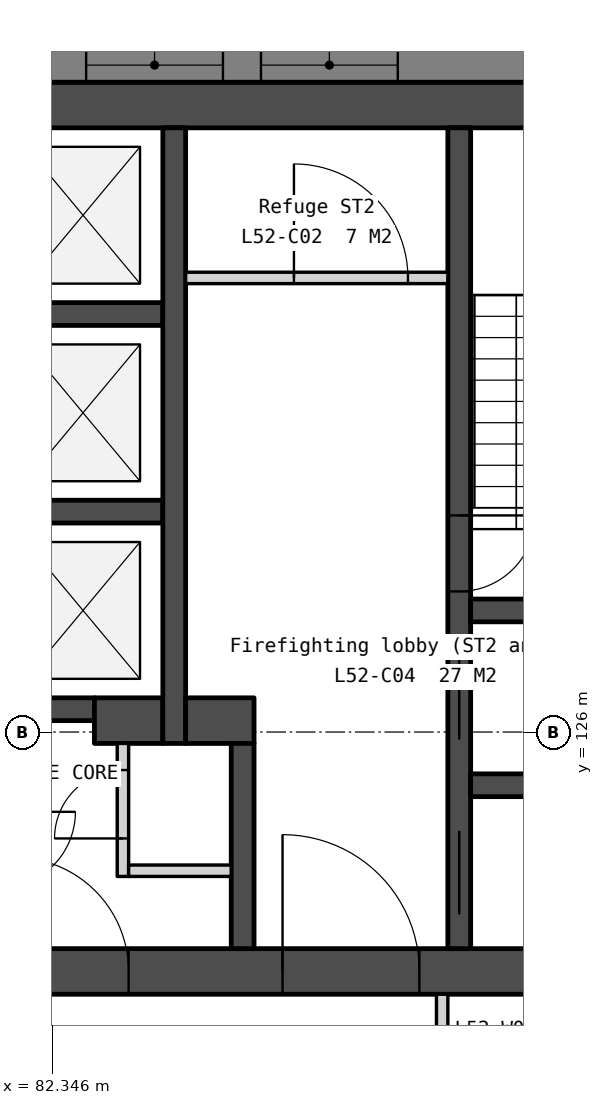
"""IFC4 building model, lengths in metres.
Left out: names, types, materials, properties, quantities, classifications, styles, units other than length and angle.
Written with IfcOpenShell. Run it as: python <this file> out.ifc"""

import sys

from ifc_helpers import new_model, si_unit, direction, frame, frame_2d, origin, place, context, subcontext, project, spatial, polyline, rectangle, outline, extrude, element, fill, save


model = new_model("IFC4")
c1 = context("Model", 3, precision=1e-05, world=origin(), true_north=direction((0.0, 1.0)))
c2 = subcontext(c1, "Body", "Model", "MODEL_VIEW")
j1 = project(units=[si_unit("LENGTHUNIT", "METRE"), si_unit("PLANEANGLEUNIT", "RADIAN")], contexts=[c1])
p1 = place(None, origin())
s1 = spatial("IfcSite", under=j1, at=p1, CompositionType="ELEMENT")
p2 = place(p1, origin())
s2 = spatial("IfcBuilding", under=s1, at=p2, CompositionType="ELEMENT")
p3 = place(p2, frame((0.0, 0.0, 207.5)))
s3 = spatial("IfcBuildingStorey", under=s2, at=p3, CompositionType="ELEMENT", Elevation=207.5)
p4 = place(p3, frame((69.0, 134.25, 0.0), z_axis=(0.0, 0.0, 1.0), x_axis=(1.0, 0.0, 0.0)))
e1 = element("IfcWall", 1, at=p4, inside=s3, PredefinedType="SOLIDWALL", context=c2, shape_type="SweptSolid", body=[
    extrude(rectangle(XDim=22.0, YDim=0.6, at=frame_2d((11.0, 0.0))), origin(), (0.0, 0.0, 1.0), 3.75),
])
p5 = place(p3, frame((69.0, 122.85, 0.0), z_axis=(0.0, 0.0, 1.0), x_axis=(1.0, 0.0, 0.0)))
e2 = element("IfcWall", 2, at=p5, inside=s3, PredefinedType="SOLIDWALL", context=c2, shape_type="SweptSolid", body=[
    extrude(rectangle(XDim=22.0, YDim=0.6, at=frame_2d((11.0, 0.0))), origin(), (0.0, 0.0, 1.0), 3.75),
])
p6 = place(p5, frame((16.375, 0.0, 0.0)))
e3 = element("IfcOpeningElement", 3, at=p6, cuts=e2, PredefinedType="OPENING", context=c2, shape_type="SweptSolid", body=[
    extrude(rectangle(XDim=1.8, YDim=2.1, at=frame_2d((0.9, 1.05))), frame((0.0, 0.31, 0.0), z_axis=(0.0, -1.0, 0.0), x_axis=(1.0, 0.0, 0.0)), (0.0, 0.0, 1.0), 0.62),
])
p7 = place(p5, frame((3.825, 0.0, 0.0)))
e4 = element("IfcOpeningElement", 4, at=p7, cuts=e2, PredefinedType="OPENING", context=c2, shape_type="SweptSolid", body=[
    extrude(rectangle(XDim=1.8, YDim=2.1, at=frame_2d((0.9, 1.05))), frame((0.0, 0.31, 0.0), z_axis=(0.0, -1.0, 0.0), x_axis=(1.0, 0.0, 0.0)), (0.0, 0.0, 1.0), 0.62),
])
p8 = place(p5, frame((12.85, 0.0, 0.0)))
e5 = element("IfcOpeningElement", 5, at=p8, cuts=e2, PredefinedType="OPENING", context=c2, shape_type="SweptSolid", body=[
    extrude(rectangle(XDim=1.5, YDim=2.1, at=frame_2d((0.75, 1.05))), frame((0.0, 0.31, 0.0), z_axis=(0.0, -1.0, 0.0), x_axis=(1.0, 0.0, 0.0)), (0.0, 0.0, 1.0), 0.62),
])
for number, where, z_axis, x_axis in (
    (6, (81.7, 131.5, 0.0), (0.0, 0.0, 1.0), (1.0, 0.0, 0.0)),
    (7, (81.7, 128.9, 0.0), (0.0, 0.0, 1.0), (1.0, 0.0, 0.0)),
):
    element("IfcWall", number, at=place(p3, frame(where, z_axis=z_axis, x_axis=x_axis)), inside=s3, PredefinedType="SOLIDWALL", context=c2, shape_type="SweptSolid", body=[
        extrude(rectangle(XDim=2.1, YDim=0.3, at=frame_2d((1.05, 0.0))), origin(), (0.0, 0.0, 1.0), 3.75),
    ])
p9 = place(p3, frame((81.7, 126.3, 0.0), z_axis=(0.0, 0.0, 1.0), x_axis=(1.0, 0.0, 0.0)))
e8 = element("IfcWall", 8, at=p9, inside=s3, PredefinedType="SOLIDWALL", context=c2, shape_type="SweptSolid", body=[
    extrude(rectangle(XDim=1.2, YDim=0.3, at=frame_2d((0.6, 0.0))), origin(), (0.0, 0.0, 1.0), 3.75),
])
p10 = place(p3, frame((82.9, 126.15, 0.0), z_axis=(0.0, 0.0, 1.0), x_axis=(1.0, 0.0, 0.0)))
e9 = element("IfcWall", 9, at=p10, inside=s3, PredefinedType="SOLIDWALL", context=c2, shape_type="SweptSolid", body=[
    extrude(rectangle(XDim=0.9, YDim=0.6, at=frame_2d((0.45, 0.0))), origin(), (0.0, 0.0, 1.0), 3.75),
])
p11 = place(p3, frame((83.275, 125.85, 0.0), z_axis=(0.0, 0.0, 1.0), x_axis=(0.0, -1.0, 0.0)))
e10 = element("IfcWall", 10, at=p11, inside=s3, PredefinedType="PARTITIONING", context=c2, shape_type="SweptSolid", body=[
    extrude(rectangle(XDim=1.75, YDim=0.15, at=frame_2d((0.875, 0.0))), origin(), (0.0, 0.0, 1.0), 3.75),
])
p12 = place(p11, frame((0.35, 0.0, 0.0)))
e11 = element("IfcOpeningElement", 11, at=p12, cuts=e10, PredefinedType="OPENING", context=c2, shape_type="SweptSolid", body=[
    extrude(rectangle(XDim=0.9, YDim=2.1, at=frame_2d((0.45, 1.05))), frame((0.0, 0.085, 0.0), z_axis=(0.0, -1.0, 0.0), x_axis=(1.0, 0.0, 0.0)), (0.0, 0.0, 1.0), 0.17),
])
p13 = place(p3, frame((83.35, 124.175, 0.0), z_axis=(0.0, 0.0, 1.0), x_axis=(1.0, 0.0, 0.0)))
e12 = element("IfcWall", 12, at=p13, inside=s3, PredefinedType="PARTITIONING", context=c2, shape_type="SweptSolid", body=[
    extrude(rectangle(XDim=1.35, YDim=0.15, at=frame_2d((0.675, 0.0))), origin(), (0.0, 0.0, 1.0), 3.75),
])
p14 = place(p3, frame((83.95, 133.95, 0.0), z_axis=(0.0, 0.0, 1.0), x_axis=(0.0, -1.0, 0.0)))
e13 = element("IfcWall", 13, at=p14, inside=s3, PredefinedType="SOLIDWALL", context=c2, shape_type="SweptSolid", body=[
    extrude(rectangle(XDim=8.1, YDim=0.3, at=frame_2d((4.05, 0.0))), origin(), (0.0, 0.0, 1.0), 3.75),
])
p15 = place(p3, frame((84.1, 131.975, 0.0), z_axis=(0.0, 0.0, 1.0), x_axis=(1.0, 0.0, 0.0)))
e14 = element("IfcWall", 14, at=p15, inside=s3, PredefinedType="PARTITIONING", context=c2, shape_type="SweptSolid", body=[
    extrude(rectangle(XDim=3.45, YDim=0.15, at=frame_2d((1.725, 0.0))), origin(), (0.0, 0.0, 1.0), 3.75),
])
p16 = place(p15, frame((1.425, 0.0, 0.0)))
e15 = element("IfcOpeningElement", 15, at=p16, cuts=e14, PredefinedType="OPENING", context=c2, shape_type="SweptSolid", body=[
    extrude(rectangle(XDim=1.5, YDim=2.1, at=frame_2d((0.75, 1.05))), frame((0.0, 0.085, 0.0), z_axis=(0.0, -1.0, 0.0), x_axis=(1.0, 0.0, 0.0)), (0.0, 0.0, 1.0), 0.17),
])
p17 = place(p3, frame((84.1, 126.15, 0.0), z_axis=(0.0, 0.0, 1.0), x_axis=(1.0, 0.0, 0.0)))
e16 = element("IfcWall", 16, at=p17, inside=s3, PredefinedType="SOLIDWALL", context=c2, shape_type="SweptSolid", body=[
    extrude(rectangle(XDim=0.9, YDim=0.6, at=frame_2d((0.45, 0.0))), origin(), (0.0, 0.0, 1.0), 3.75),
])
p18 = place(p3, frame((84.85, 125.85, 0.0), z_axis=(0.0, 0.0, 1.0), x_axis=(0.0, -1.0, 0.0)))
e17 = element("IfcWall", 17, at=p18, inside=s3, PredefinedType="SOLIDWALL", context=c2, shape_type="SweptSolid", body=[
    extrude(rectangle(XDim=2.7, YDim=0.3, at=frame_2d((1.35, 0.0))), origin(), (0.0, 0.0, 1.0), 3.75),
])
p19 = place(p3, frame((87.7, 133.95, 0.0), z_axis=(0.0, 0.0, 1.0), x_axis=(0.0, -1.0, 0.0)))
e18 = element("IfcWall", 18, at=p19, inside=s3, PredefinedType="SOLIDWALL", context=c2, shape_type="SweptSolid", body=[
    extrude(rectangle(XDim=10.8, YDim=0.3, at=frame_2d((5.4, 0.0))), origin(), (0.0, 0.0, 1.0), 3.75),
])
p20 = place(p19, frame((6.95, 0.0, 0.0)))
e19 = element("IfcOpeningElement", 19, at=p20, cuts=e18, PredefinedType="OPENING", context=c2, shape_type="SweptSolid", body=[
    extrude(rectangle(XDim=1.1, YDim=2.1, at=frame_2d((0.55, 1.05))), frame((0.0, 0.16, 0.0), z_axis=(0.0, -1.0, 0.0), x_axis=(1.0, 0.0, 0.0)), (0.0, 0.0, 1.0), 0.32),
])
p21 = place(p19, frame((5.1, 0.0, 0.0)))
e20 = element("IfcOpeningElement", 20, at=p21, cuts=e18, PredefinedType="OPENING", context=c2, shape_type="SweptSolid", body=[
    extrude(rectangle(XDim=1.0, YDim=2.1, at=frame_2d((0.5, 1.05))), frame((0.0, 0.16, 0.0), z_axis=(0.0, -1.0, 0.0), x_axis=(1.0, 0.0, 0.0)), (0.0, 0.0, 1.0), 0.32),
])
p22 = place(p19, frame((9.25, 0.0, 0.0)))
e21 = element("IfcOpeningElement", 21, at=p22, cuts=e18, PredefinedType="OPENING", context=c2, shape_type="SweptSolid", body=[
    extrude(rectangle(XDim=1.1, YDim=2.1, at=frame_2d((0.55, 1.05))), frame((0.0, 0.16, 0.0), z_axis=(0.0, -1.0, 0.0), x_axis=(1.0, 0.0, 0.0)), (0.0, 0.0, 1.0), 0.32),
])
for number, where, z_axis, x_axis in (
    (22, (87.85, 127.6, 0.0), (0.0, 0.0, 1.0), (1.0, 0.0, 0.0)),
    (23, (87.85, 125.3, 0.0), (0.0, 0.0, 1.0), (1.0, 0.0, 0.0)),
):
    element("IfcWall", number, at=place(p3, frame(where, z_axis=z_axis, x_axis=x_axis)), inside=s3, PredefinedType="SOLIDWALL", context=c2, shape_type="SweptSolid", body=[
        extrude(rectangle(XDim=2.55, YDim=0.3, at=frame_2d((1.275, 0.0))), origin(), (0.0, 0.0, 1.0), 3.75),
    ])
p23 = place(p3, frame((99.365, 134.775, -0.15), z_axis=(0.0, 0.0, 1.0), x_axis=(-1.0, 0.0, 0.0)))
e24 = element("IfcWall", 24, at=p23, inside=s3, PredefinedType="SOLIDWALL", context=c2, shape_type="SweptSolid", body=[
    extrude(outline(polyline([(38.729, 0.0), (38.729, 3.9), (0.0, 3.9), (0.0, 0.0), (38.729, 0.0)])), frame((0.0, 0.225, 0.0), z_axis=(0.0, -1.0, 0.0), x_axis=(1.0, 0.0, 0.0)), (0.0, 0.0, 1.0), 0.45),
])
p24 = place(p23, frame((2.791, 0.0, 0.95)))
e25 = element("IfcOpeningElement", 25, at=p24, cuts=e24, PredefinedType="OPENING", context=c2, shape_type="SweptSolid", body=[
    extrude(rectangle(XDim=1.8, YDim=2.2, at=frame_2d((0.9, 1.1))), frame((0.0, 0.235, 0.0), z_axis=(0.0, -1.0, 0.0), x_axis=(1.0, 0.0, 0.0)), (0.0, 0.0, 1.0), 0.47),
])
p25 = place(p23, frame((5.091, 0.0, 0.95)))
e26 = element("IfcOpeningElement", 26, at=p25, cuts=e24, PredefinedType="OPENING", context=c2, shape_type="SweptSolid", body=[
    extrude(rectangle(XDim=1.8, YDim=2.2, at=frame_2d((0.9, 1.1))), frame((0.0, 0.235, 0.0), z_axis=(0.0, -1.0, 0.0), x_axis=(1.0, 0.0, 0.0)), (0.0, 0.0, 1.0), 0.47),
])
p26 = place(p23, frame((12.473, 0.0, 0.95)))
e27 = element("IfcOpeningElement", 27, at=p26, cuts=e24, PredefinedType="OPENING", context=c2, shape_type="SweptSolid", body=[
    extrude(rectangle(XDim=1.8, YDim=2.2, at=frame_2d((0.9, 1.1))), frame((0.0, 0.235, 0.0), z_axis=(0.0, -1.0, 0.0), x_axis=(1.0, 0.0, 0.0)), (0.0, 0.0, 1.0), 0.47),
])
p27 = place(p23, frame((14.773, 0.0, 0.95)))
e28 = element("IfcOpeningElement", 28, at=p27, cuts=e24, PredefinedType="OPENING", context=c2, shape_type="SweptSolid", body=[
    extrude(rectangle(XDim=1.8, YDim=2.2, at=frame_2d((0.9, 1.1))), frame((0.0, 0.235, 0.0), z_axis=(0.0, -1.0, 0.0), x_axis=(1.0, 0.0, 0.0)), (0.0, 0.0, 1.0), 0.47),
])
p28 = place(p23, frame((22.156, 0.0, 0.95)))
e29 = element("IfcOpeningElement", 29, at=p28, cuts=e24, PredefinedType="OPENING", context=c2, shape_type="SweptSolid", body=[
    extrude(rectangle(XDim=1.8, YDim=2.2, at=frame_2d((0.9, 1.1))), frame((0.0, 0.235, 0.0), z_axis=(0.0, -1.0, 0.0), x_axis=(1.0, 0.0, 0.0)), (0.0, 0.0, 1.0), 0.47),
])
p29 = place(p23, frame((24.456, 0.0, 0.95)))
e30 = element("IfcOpeningElement", 30, at=p29, cuts=e24, PredefinedType="OPENING", context=c2, shape_type="SweptSolid", body=[
    extrude(rectangle(XDim=1.8, YDim=2.2, at=frame_2d((0.9, 1.1))), frame((0.0, 0.235, 0.0), z_axis=(0.0, -1.0, 0.0), x_axis=(1.0, 0.0, 0.0)), (0.0, 0.0, 1.0), 0.47),
])
p30 = place(p23, frame((31.838, 0.0, 0.95)))
e31 = element("IfcOpeningElement", 31, at=p30, cuts=e24, PredefinedType="OPENING", context=c2, shape_type="SweptSolid", body=[
    extrude(rectangle(XDim=1.8, YDim=2.2, at=frame_2d((0.9, 1.1))), frame((0.0, 0.235, 0.0), z_axis=(0.0, -1.0, 0.0), x_axis=(1.0, 0.0, 0.0)), (0.0, 0.0, 1.0), 0.47),
])
p31 = place(p23, frame((34.138, 0.0, 0.95)))
e32 = element("IfcOpeningElement", 32, at=p31, cuts=e24, PredefinedType="OPENING", context=c2, shape_type="SweptSolid", body=[
    extrude(rectangle(XDim=1.8, YDim=2.2, at=frame_2d((0.9, 1.1))), frame((0.0, 0.235, 0.0), z_axis=(0.0, -1.0, 0.0), x_axis=(1.0, 0.0, 0.0)), (0.0, 0.0, 1.0), 0.47),
])
p32 = place(p3, frame((81.505, 98.627, -0.15), z_axis=(0.0, 0.0, 1.0), x_axis=(0.500002199942, 0.866024133644, 0.0)))
e33 = element("IfcWall", 33, at=p32, inside=s3, PredefinedType="SOLIDWALL", context=c2, shape_type="SweptSolid", body=[
    extrude(outline(polyline([(38.729, 0.0), (38.729, 3.9), (0.0, 3.9), (0.0, 0.0), (38.729, 0.0)])), frame((0.0, 0.225, 0.0), z_axis=(0.0, -1.0, 0.0), x_axis=(1.0, 0.0, 0.0)), (0.0, 0.0, 1.0), 0.45),
])
p33 = place(p32, frame((2.791, 0.0, 0.95)))
e34 = element("IfcOpeningElement", 34, at=p33, cuts=e33, PredefinedType="OPENING", context=c2, shape_type="SweptSolid", body=[
    extrude(rectangle(XDim=1.8, YDim=2.2, at=frame_2d((0.9, 1.1))), frame((0.0, 0.235, 0.0), z_axis=(0.0, -1.0, 0.0), x_axis=(1.0, 0.0, 0.0)), (0.0, 0.0, 1.0), 0.47),
])
p34 = place(p32, frame((5.091, 0.0, 0.95)))
e35 = element("IfcOpeningElement", 35, at=p34, cuts=e33, PredefinedType="OPENING", context=c2, shape_type="SweptSolid", body=[
    extrude(rectangle(XDim=1.8, YDim=2.2, at=frame_2d((0.9, 1.1))), frame((0.0, 0.235, 0.0), z_axis=(0.0, -1.0, 0.0), x_axis=(1.0, 0.0, 0.0)), (0.0, 0.0, 1.0), 0.47),
])
p35 = place(p32, frame((12.473, 0.0, 0.95)))
e36 = element("IfcOpeningElement", 36, at=p35, cuts=e33, PredefinedType="OPENING", context=c2, shape_type="SweptSolid", body=[
    extrude(rectangle(XDim=1.8, YDim=2.2, at=frame_2d((0.9, 1.1))), frame((0.0, 0.235, 0.0), z_axis=(0.0, -1.0, 0.0), x_axis=(1.0, 0.0, 0.0)), (0.0, 0.0, 1.0), 0.47),
])
p36 = place(p32, frame((14.773, 0.0, 0.95)))
e37 = element("IfcOpeningElement", 37, at=p36, cuts=e33, PredefinedType="OPENING", context=c2, shape_type="SweptSolid", body=[
    extrude(rectangle(XDim=1.8, YDim=2.2, at=frame_2d((0.9, 1.1))), frame((0.0, 0.235, 0.0), z_axis=(0.0, -1.0, 0.0), x_axis=(1.0, 0.0, 0.0)), (0.0, 0.0, 1.0), 0.47),
])
p37 = place(p32, frame((22.156, 0.0, 0.95)))
e38 = element("IfcOpeningElement", 38, at=p37, cuts=e33, PredefinedType="OPENING", context=c2, shape_type="SweptSolid", body=[
    extrude(rectangle(XDim=1.8, YDim=2.2, at=frame_2d((0.9, 1.1))), frame((0.0, 0.235, 0.0), z_axis=(0.0, -1.0, 0.0), x_axis=(1.0, 0.0, 0.0)), (0.0, 0.0, 1.0), 0.47),
])
p38 = place(p32, frame((24.456, 0.0, 0.95)))
e39 = element("IfcOpeningElement", 39, at=p38, cuts=e33, PredefinedType="OPENING", context=c2, shape_type="SweptSolid", body=[
    extrude(rectangle(XDim=1.8, YDim=2.2, at=frame_2d((0.9, 1.1))), frame((0.0, 0.235, 0.0), z_axis=(0.0, -1.0, 0.0), x_axis=(1.0, 0.0, 0.0)), (0.0, 0.0, 1.0), 0.47),
])
p39 = place(p32, frame((31.838, 0.0, 0.95)))
e40 = element("IfcOpeningElement", 40, at=p39, cuts=e33, PredefinedType="OPENING", context=c2, shape_type="SweptSolid", body=[
    extrude(rectangle(XDim=1.8, YDim=2.2, at=frame_2d((0.9, 1.1))), frame((0.0, 0.235, 0.0), z_axis=(0.0, -1.0, 0.0), x_axis=(1.0, 0.0, 0.0)), (0.0, 0.0, 1.0), 0.47),
])
p40 = place(p32, frame((34.138, 0.0, 0.95)))
e41 = element("IfcOpeningElement", 41, at=p40, cuts=e33, PredefinedType="OPENING", context=c2, shape_type="SweptSolid", body=[
    extrude(rectangle(XDim=1.8, YDim=2.2, at=frame_2d((0.9, 1.1))), frame((0.0, 0.235, 0.0), z_axis=(0.0, -1.0, 0.0), x_axis=(1.0, 0.0, 0.0)), (0.0, 0.0, 1.0), 0.47),
])
p41 = place(p3, frame((87.475, 120.05, 0.0), z_axis=(0.0, 0.0, 1.0), x_axis=(0.0, 1.0, 0.0)))
e42 = element("IfcWall", 42, at=p41, inside=s3, PredefinedType="PARTITIONING", context=c2, shape_type="SweptSolid", body=[
    extrude(rectangle(XDim=2.5, YDim=0.15, at=frame_2d((1.25, 0.0))), origin(), (0.0, 0.0, 1.0), 3.75),
])
p42 = place(p41, frame((0.75, 0.0, 0.0)))
e43 = element("IfcOpeningElement", 43, at=p42, cuts=e42, PredefinedType="OPENING", context=c2, shape_type="SweptSolid", body=[
    extrude(rectangle(XDim=1.0, YDim=2.1, at=frame_2d((0.5, 1.05))), frame((0.0, 0.085, 0.0), z_axis=(0.0, -1.0, 0.0), x_axis=(1.0, 0.0, 0.0)), (0.0, 0.0, 1.0), 0.17),
])
p43 = place(p20, origin())
e44 = element("IfcDoor", 44, at=p43, inside=s3, OperationType="SLIDING_TO_LEFT", PredefinedType="DOOR", context=c2, shape_type="SweptSolid", body=[
    extrude(rectangle(XDim=1.1, YDim=2.1, at=frame_2d((0.55, 1.05))), frame((0.0, 0.025, 0.0), z_axis=(0.0, -1.0, 0.0), x_axis=(1.0, 0.0, 0.0)), (0.0, 0.0, 1.0), 0.05),
])
fill(e19, e44)
p44 = place(p6, origin())
e45 = element("IfcDoor", 45, at=p44, inside=s3, OperationType="DOUBLE_DOOR_DOUBLE_SWING", PredefinedType="DOOR", context=c2, shape_type="SweptSolid", body=[
    extrude(rectangle(XDim=1.8, YDim=2.1, at=frame_2d((0.9, 1.05))), frame((0.0, 0.025, 0.0), z_axis=(0.0, -1.0, 0.0), x_axis=(1.0, 0.0, 0.0)), (0.0, 0.0, 1.0), 0.05),
])
fill(e3, e45)
p45 = place(p8, origin())
e46 = element("IfcDoor", 46, at=p45, inside=s3, OperationType="DOUBLE_DOOR_DOUBLE_SWING", PredefinedType="DOOR", context=c2, shape_type="SweptSolid", body=[
    extrude(rectangle(XDim=1.5, YDim=2.1, at=frame_2d((0.75, 1.05))), frame((0.0, 0.025, 0.0), z_axis=(0.0, -1.0, 0.0), x_axis=(1.0, 0.0, 0.0)), (0.0, 0.0, 1.0), 0.05),
])
fill(e5, e46)
p46 = place(p12, origin())
e47 = element("IfcDoor", 47, at=p46, inside=s3, OperationType="SINGLE_SWING_RIGHT", PredefinedType="DOOR", context=c2, shape_type="SweptSolid", body=[
    extrude(rectangle(XDim=0.9, YDim=2.1, at=frame_2d((0.45, 1.05))), frame((0.0, 0.025, 0.0), z_axis=(0.0, -1.0, 0.0), x_axis=(1.0, 0.0, 0.0)), (0.0, 0.0, 1.0), 0.05),
])
fill(e11, e47)
p47 = place(p16, origin())
e48 = element("IfcDoor", 48, at=p47, inside=s3, OperationType="DOUBLE_DOOR_DOUBLE_SWING", PredefinedType="DOOR", context=c2, shape_type="SweptSolid", body=[
    extrude(rectangle(XDim=1.5, YDim=2.1, at=frame_2d((0.75, 1.05))), frame((0.0, 0.025, 0.0), z_axis=(0.0, -1.0, 0.0), x_axis=(1.0, 0.0, 0.0)), (0.0, 0.0, 1.0), 0.05),
])
fill(e15, e48)
p48 = place(p21, origin())
e49 = element("IfcDoor", 49, at=p48, inside=s3, OperationType="SINGLE_SWING_LEFT", PredefinedType="DOOR", context=c2, shape_type="SweptSolid", body=[
    extrude(rectangle(XDim=1.0, YDim=2.1, at=frame_2d((0.5, 1.05))), frame((0.0, 0.025, 0.0), z_axis=(0.0, -1.0, 0.0), x_axis=(1.0, 0.0, 0.0)), (0.0, 0.0, 1.0), 0.05),
])
fill(e20, e49)
p49 = place(p22, origin())
e50 = element("IfcDoor", 50, at=p49, inside=s3, OperationType="SLIDING_TO_LEFT", PredefinedType="DOOR", context=c2, shape_type="SweptSolid", body=[
    extrude(rectangle(XDim=1.1, YDim=2.1, at=frame_2d((0.55, 1.05))), frame((0.0, 0.025, 0.0), z_axis=(0.0, -1.0, 0.0), x_axis=(1.0, 0.0, 0.0)), (0.0, 0.0, 1.0), 0.05),
])
fill(e21, e50)
p50 = place(p26, origin())
e51 = element("IfcWindow", 51, at=p50, inside=s3, PartitioningType="SINGLE_PANEL", PredefinedType="WINDOW", context=c2, shape_type="SweptSolid", body=[
    extrude(rectangle(XDim=1.8, YDim=2.2, at=frame_2d((0.9, 1.1))), frame((0.0, 0.03, 0.0), z_axis=(0.0, -1.0, 0.0), x_axis=(1.0, 0.0, 0.0)), (0.0, 0.0, 1.0), 0.06),
])
fill(e27, e51)
p51 = place(p27, origin())
e52 = element("IfcWindow", 52, at=p51, inside=s3, PartitioningType="SINGLE_PANEL", PredefinedType="WINDOW", context=c2, shape_type="SweptSolid", body=[
    extrude(rectangle(XDim=1.8, YDim=2.2, at=frame_2d((0.9, 1.1))), frame((0.0, 0.03, 0.0), z_axis=(0.0, -1.0, 0.0), x_axis=(1.0, 0.0, 0.0)), (0.0, 0.0, 1.0), 0.06),
])
fill(e28, e52)
save(model, sys.argv[1])
